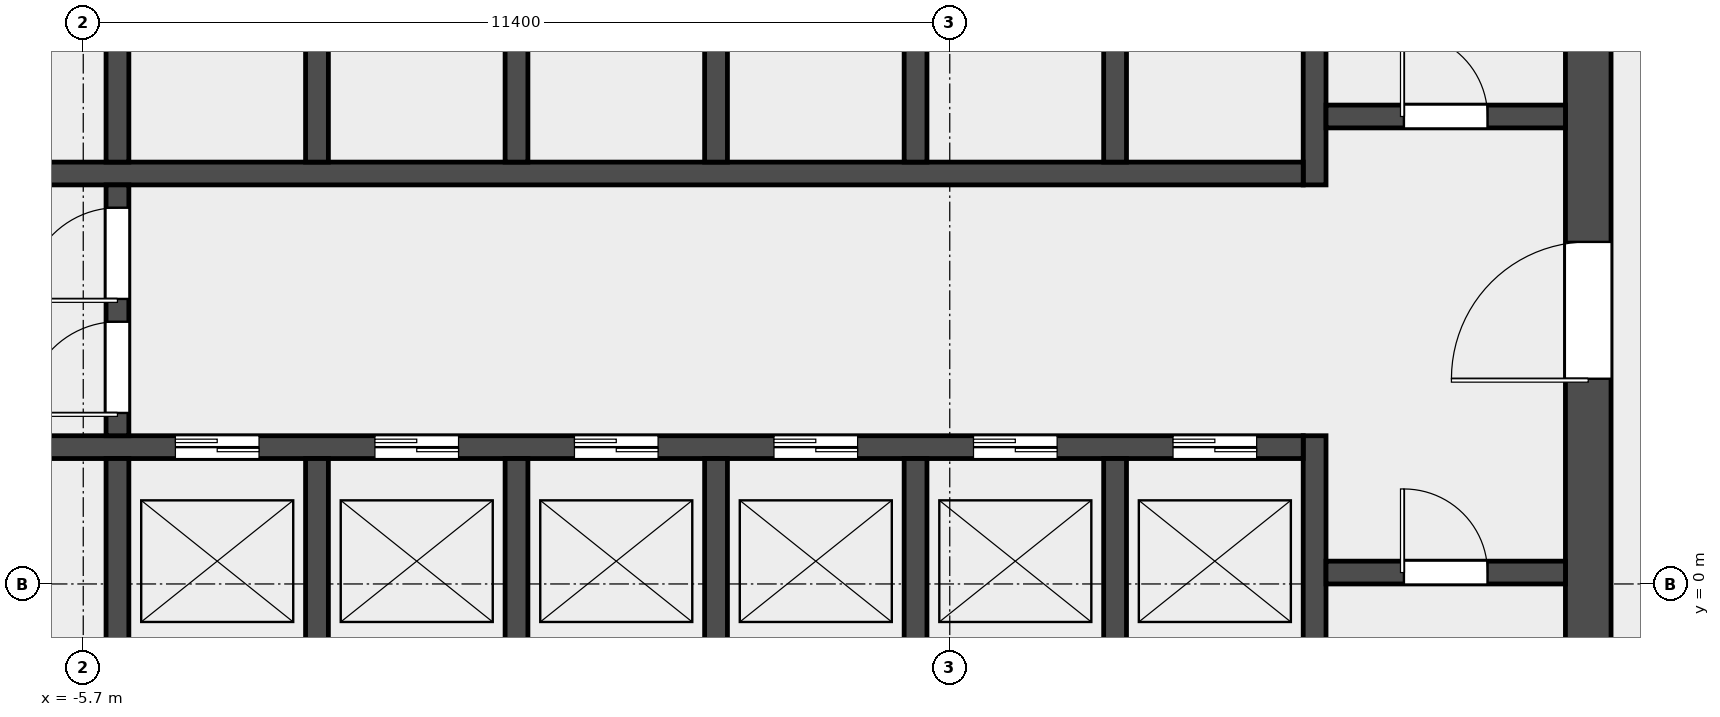
"""IFC4 building model, lengths in metres.
Left out: names, types, materials, properties, quantities, classifications, styles, units other than length and angle.
Written with IfcOpenShell. Run it as: python <this file> out.ifc"""

import sys

from ifc_helpers import new_model, si_unit, direction, frame, frame_2d, origin, place, context, subcontext, project, spatial, rectangle, extrude, element, fill, save


model = new_model("IFC4")
c1 = context("Model", 3, precision=1e-05, world=origin(), true_north=direction((0.0, 1.0)))
c2 = subcontext(c1, "Body", "Model", "MODEL_VIEW")
j1 = project(units=[si_unit("LENGTHUNIT", "METRE"), si_unit("PLANEANGLEUNIT", "RADIAN")], contexts=[c1])
p1 = place(None, origin())
s1 = spatial("IfcSite", under=j1, at=p1, CompositionType="ELEMENT")
p2 = place(p1, origin())
s2 = spatial("IfcBuilding", under=s1, at=p2, CompositionType="ELEMENT")
p3 = place(p2, frame((0.0, 0.0, 157.0)))
s3 = spatial("IfcBuildingStorey", under=s2, at=p3, CompositionType="ELEMENT", Elevation=157.0)
p4 = place(p3, frame((14.1, -6.6, 0.0), z_axis=(0.0, 0.0, 1.0), x_axis=(0.0, 1.0, 0.0)))
e1 = element("IfcWall", 1, at=p4, inside=s3, PredefinedType="SHEAR", context=c2, shape_type="SweptSolid", body=[
    extrude(rectangle(XDim=19.5, YDim=0.6, at=frame_2d((9.75, 0.0))), origin(), (0.0, 0.0, 1.0), 3.7),
])
p5 = place(p4, frame((9.3, 0.0, 0.0)))
e2 = element("IfcOpeningElement", 2, at=p5, cuts=e1, PredefinedType="OPENING", context=c2, shape_type="SweptSolid", body=[
    extrude(rectangle(XDim=1.8, YDim=2.1, at=frame_2d((0.9, 1.05))), frame((0.0, 0.312, 0.0), z_axis=(0.0, -1.0, 0.0), x_axis=(1.0, 0.0, 0.0)), (0.0, 0.0, 1.0), 0.624),
])
p6 = place(p3, frame((10.5, -6.6, 0.0), z_axis=(0.0, 0.0, 1.0), x_axis=(0.0, 1.0, 0.0)))
e3 = element("IfcWall", 3, at=p6, inside=s3, PredefinedType="SHEAR", context=c2, shape_type="SweptSolid", body=[
    extrude(rectangle(XDim=8.55, YDim=0.3, at=frame_2d((4.275, 0.0))), origin(), (0.0, 0.0, 1.0), 3.7),
])
p7 = place(p3, frame((10.5, 5.25, 0.0), z_axis=(0.0, 0.0, 1.0), x_axis=(0.0, 1.0, 0.0)))
e4 = element("IfcWall", 4, at=p7, inside=s3, PredefinedType="SHEAR", context=c2, shape_type="SweptSolid", body=[
    extrude(rectangle(XDim=7.65, YDim=0.3, at=frame_2d((3.825, 0.0))), origin(), (0.0, 0.0, 1.0), 3.7),
])
p8 = place(p3, frame((10.65, 0.15, 0.0), z_axis=(0.0, 0.0, 1.0), x_axis=(1.0, 0.0, 0.0)))
e5 = element("IfcWall", 5, at=p8, inside=s3, PredefinedType="SOLIDWALL", context=c2, shape_type="SweptSolid", body=[
    extrude(rectangle(XDim=3.15, YDim=0.3, at=frame_2d((1.575, 0.0))), origin(), (0.0, 0.0, 1.0), 3.7),
])
p9 = place(p8, frame((1.025, 0.0, 0.0)))
e6 = element("IfcOpeningElement", 6, at=p9, cuts=e5, PredefinedType="OPENING", context=c2, shape_type="SweptSolid", body=[
    extrude(rectangle(XDim=1.1, YDim=2.1, at=frame_2d((0.55, 1.05))), frame((0.0, 0.162, 0.0), z_axis=(0.0, -1.0, 0.0), x_axis=(1.0, 0.0, 0.0)), (0.0, 0.0, 1.0), 0.324),
])
p10 = place(p3, frame((10.65, 6.15, 0.0), z_axis=(0.0, 0.0, 1.0), x_axis=(1.0, 0.0, 0.0)))
e7 = element("IfcWall", 7, at=p10, inside=s3, PredefinedType="SOLIDWALL", context=c2, shape_type="SweptSolid", body=[
    extrude(rectangle(XDim=3.15, YDim=0.3, at=frame_2d((1.575, 0.0))), origin(), (0.0, 0.0, 1.0), 3.7),
])
p11 = place(p10, frame((1.025, 0.0, 0.0)))
e8 = element("IfcOpeningElement", 8, at=p11, cuts=e7, PredefinedType="OPENING", context=c2, shape_type="SweptSolid", body=[
    extrude(rectangle(XDim=1.1, YDim=2.1, at=frame_2d((0.55, 1.05))), frame((0.0, 0.162, 0.0), z_axis=(0.0, -1.0, 0.0), x_axis=(1.0, 0.0, 0.0)), (0.0, 0.0, 1.0), 0.324),
])
p12 = place(p3, frame((-10.35, 1.8, 0.0), z_axis=(0.0, 0.0, 1.0), x_axis=(1.0, 0.0, 0.0)))
e9 = element("IfcWall", 9, at=p12, inside=s3, PredefinedType="SOLIDWALL", context=c2, shape_type="SweptSolid", body=[
    extrude(rectangle(XDim=20.7, YDim=0.3, at=frame_2d((10.35, 0.0))), origin(), (0.0, 0.0, 1.0), 3.7),
])
p13 = place(p12, frame((0.512, 0.0, 0.0)))
e10 = element("IfcOpeningElement", 10, at=p13, cuts=e9, PredefinedType="OPENING", context=c2, shape_type="SweptSolid", body=[
    extrude(rectangle(XDim=1.3, YDim=2.1, at=frame_2d((0.65, 1.05))), frame((0.0, 0.162, 0.0), z_axis=(0.0, -1.0, 0.0), x_axis=(1.0, 0.0, 0.0)), (0.0, 0.0, 1.0), 0.324),
])
p14 = place(p12, frame((5.863, 0.0, 0.0)))
e11 = element("IfcOpeningElement", 11, at=p14, cuts=e9, PredefinedType="OPENING", context=c2, shape_type="SweptSolid", body=[
    extrude(rectangle(XDim=1.1, YDim=2.1, at=frame_2d((0.55, 1.05))), frame((0.0, 0.162, 0.0), z_axis=(0.0, -1.0, 0.0), x_axis=(1.0, 0.0, 0.0)), (0.0, 0.0, 1.0), 0.324),
])
p15 = place(p12, frame((8.488, 0.0, 0.0)))
e12 = element("IfcOpeningElement", 12, at=p15, cuts=e9, PredefinedType="OPENING", context=c2, shape_type="SweptSolid", body=[
    extrude(rectangle(XDim=1.1, YDim=2.1, at=frame_2d((0.55, 1.05))), frame((0.0, 0.162, 0.0), z_axis=(0.0, -1.0, 0.0), x_axis=(1.0, 0.0, 0.0)), (0.0, 0.0, 1.0), 0.324),
])
p16 = place(p12, frame((11.113, 0.0, 0.0)))
e13 = element("IfcOpeningElement", 13, at=p16, cuts=e9, PredefinedType="OPENING", context=c2, shape_type="SweptSolid", body=[
    extrude(rectangle(XDim=1.1, YDim=2.1, at=frame_2d((0.55, 1.05))), frame((0.0, 0.162, 0.0), z_axis=(0.0, -1.0, 0.0), x_axis=(1.0, 0.0, 0.0)), (0.0, 0.0, 1.0), 0.324),
])
p17 = place(p12, frame((13.738, 0.0, 0.0)))
e14 = element("IfcOpeningElement", 14, at=p17, cuts=e9, PredefinedType="OPENING", context=c2, shape_type="SweptSolid", body=[
    extrude(rectangle(XDim=1.1, YDim=2.1, at=frame_2d((0.55, 1.05))), frame((0.0, 0.162, 0.0), z_axis=(0.0, -1.0, 0.0), x_axis=(1.0, 0.0, 0.0)), (0.0, 0.0, 1.0), 0.324),
])
p18 = place(p12, frame((16.363, 0.0, 0.0)))
e15 = element("IfcOpeningElement", 15, at=p18, cuts=e9, PredefinedType="OPENING", context=c2, shape_type="SweptSolid", body=[
    extrude(rectangle(XDim=1.1, YDim=2.1, at=frame_2d((0.55, 1.05))), frame((0.0, 0.162, 0.0), z_axis=(0.0, -1.0, 0.0), x_axis=(1.0, 0.0, 0.0)), (0.0, 0.0, 1.0), 0.324),
])
p19 = place(p12, frame((18.988, 0.0, 0.0)))
e16 = element("IfcOpeningElement", 16, at=p19, cuts=e9, PredefinedType="OPENING", context=c2, shape_type="SweptSolid", body=[
    extrude(rectangle(XDim=1.1, YDim=2.1, at=frame_2d((0.55, 1.05))), frame((0.0, 0.162, 0.0), z_axis=(0.0, -1.0, 0.0), x_axis=(1.0, 0.0, 0.0)), (0.0, 0.0, 1.0), 0.324),
])
p20 = place(p3, frame((-10.35, 5.4, 0.0), z_axis=(0.0, 0.0, 1.0), x_axis=(1.0, 0.0, 0.0)))
e17 = element("IfcWall", 17, at=p20, inside=s3, PredefinedType="SOLIDWALL", context=c2, shape_type="SweptSolid", body=[
    extrude(rectangle(XDim=20.7, YDim=0.3, at=frame_2d((10.35, 0.0))), origin(), (0.0, 0.0, 1.0), 3.7),
])
p21 = place(p20, frame((0.512, 0.0, 0.0)))
e18 = element("IfcOpeningElement", 18, at=p21, cuts=e17, PredefinedType="OPENING", context=c2, shape_type="SweptSolid", body=[
    extrude(rectangle(XDim=1.3, YDim=2.1, at=frame_2d((0.65, 1.05))), frame((0.0, 0.162, 0.0), z_axis=(0.0, -1.0, 0.0), x_axis=(1.0, 0.0, 0.0)), (0.0, 0.0, 1.0), 0.324),
])
for number, where, z_axis, x_axis in (
    (19, (-5.25, -1.05, 0.0), (0.0, 0.0, 1.0), (0.0, 1.0, 0.0)),
    (20, (-2.625, -1.05, 0.0), (0.0, 0.0, 1.0), (0.0, 1.0, 0.0)),
    (21, (0.0, -1.05, 0.0), (0.0, 0.0, 1.0), (0.0, 1.0, 0.0)),
    (22, (2.625, -1.05, 0.0), (0.0, 0.0, 1.0), (0.0, 1.0, 0.0)),
    (23, (5.25, -1.05, 0.0), (0.0, 0.0, 1.0), (0.0, 1.0, 0.0)),
    (24, (7.875, -1.05, 0.0), (0.0, 0.0, 1.0), (0.0, 1.0, 0.0)),
    (25, (-5.25, 5.55, 0.0), (0.0, 0.0, 1.0), (0.0, 1.0, 0.0)),
    (26, (-2.625, 5.55, 0.0), (0.0, 0.0, 1.0), (0.0, 1.0, 0.0)),
    (27, (0.0, 5.55, 0.0), (0.0, 0.0, 1.0), (0.0, 1.0, 0.0)),
    (28, (2.625, 5.55, 0.0), (0.0, 0.0, 1.0), (0.0, 1.0, 0.0)),
    (29, (5.25, 5.55, 0.0), (0.0, 0.0, 1.0), (0.0, 1.0, 0.0)),
    (30, (7.875, 5.55, 0.0), (0.0, 0.0, 1.0), (0.0, 1.0, 0.0)),
):
    element("IfcWall", number, at=place(p3, frame(where, z_axis=z_axis, x_axis=x_axis)), inside=s3, PredefinedType="SOLIDWALL", context=c2, shape_type="SweptSolid", body=[
        extrude(rectangle(XDim=2.7, YDim=0.3, at=frame_2d((1.35, 0.0))), origin(), (0.0, 0.0, 1.0), 3.7),
    ])
p22 = place(p3, frame((-5.25, 1.95, 0.0), z_axis=(0.0, 0.0, 1.0), x_axis=(0.0, 1.0, 0.0)))
e31 = element("IfcWall", 31, at=p22, inside=s3, PredefinedType="SOLIDWALL", context=c2, shape_type="SweptSolid", body=[
    extrude(rectangle(XDim=3.3, YDim=0.3, at=frame_2d((1.65, 0.0))), origin(), (0.0, 0.0, 1.0), 3.7),
])
p23 = place(p22, frame((0.3, 0.0, 0.0)))
e32 = element("IfcOpeningElement", 32, at=p23, cuts=e31, PredefinedType="OPENING", context=c2, shape_type="SweptSolid", body=[
    extrude(rectangle(XDim=1.2, YDim=2.1, at=frame_2d((0.6, 1.05))), frame((0.0, 0.162, 0.0), z_axis=(0.0, -1.0, 0.0), x_axis=(1.0, 0.0, 0.0)), (0.0, 0.0, 1.0), 0.324),
])
p24 = place(p22, frame((1.8, 0.0, 0.0)))
e33 = element("IfcOpeningElement", 33, at=p24, cuts=e31, PredefinedType="OPENING", context=c2, shape_type="SweptSolid", body=[
    extrude(rectangle(XDim=1.2, YDim=2.1, at=frame_2d((0.6, 1.05))), frame((0.0, 0.162, 0.0), z_axis=(0.0, -1.0, 0.0), x_axis=(1.0, 0.0, 0.0)), (0.0, 0.0, 1.0), 0.324),
])
p25 = place(p9, origin())
e34 = element("IfcDoor", 34, at=p25, inside=s3, OperationType="SINGLE_SWING_RIGHT", PredefinedType="DOOR", context=c2, shape_type="SweptSolid", body=[
    extrude(rectangle(XDim=1.1, YDim=2.1, at=frame_2d((0.55, 1.05))), frame((0.0, 0.025, 0.0), z_axis=(0.0, -1.0, 0.0), x_axis=(1.0, 0.0, 0.0)), (0.0, 0.0, 1.0), 0.05),
])
fill(e6, e34)
p26 = place(p11, origin())
e35 = element("IfcDoor", 35, at=p26, inside=s3, OperationType="SINGLE_SWING_RIGHT", PredefinedType="DOOR", context=c2, shape_type="SweptSolid", body=[
    extrude(rectangle(XDim=1.1, YDim=2.1, at=frame_2d((0.55, 1.05))), frame((0.0, 0.025, 0.0), z_axis=(0.0, -1.0, 0.0), x_axis=(1.0, 0.0, 0.0)), (0.0, 0.0, 1.0), 0.05),
])
fill(e8, e35)
p27 = place(p5, origin())
e36 = element("IfcDoor", 36, at=p27, inside=s3, OperationType="DOUBLE_DOOR_SINGLE_SWING", PredefinedType="DOOR", context=c2, shape_type="SweptSolid", body=[
    extrude(rectangle(XDim=1.8, YDim=2.1, at=frame_2d((0.9, 1.05))), frame((0.0, 0.025, 0.0), z_axis=(0.0, -1.0, 0.0), x_axis=(1.0, 0.0, 0.0)), (0.0, 0.0, 1.0), 0.05),
])
fill(e2, e36)
p28 = place(p23, origin())
e37 = element("IfcDoor", 37, at=p28, inside=s3, OperationType="SINGLE_SWING_LEFT", PredefinedType="DOOR", context=c2, shape_type="SweptSolid", body=[
    extrude(rectangle(XDim=1.2, YDim=2.1, at=frame_2d((0.6, 1.05))), frame((0.0, 0.025, 0.0), z_axis=(0.0, -1.0, 0.0), x_axis=(1.0, 0.0, 0.0)), (0.0, 0.0, 1.0), 0.05),
])
fill(e32, e37)
p29 = place(p24, origin())
e38 = element("IfcDoor", 38, at=p29, inside=s3, OperationType="SINGLE_SWING_RIGHT", PredefinedType="DOOR", context=c2, shape_type="SweptSolid", body=[
    extrude(rectangle(XDim=1.2, YDim=2.1, at=frame_2d((0.6, 1.05))), frame((0.0, 0.025, 0.0), z_axis=(0.0, -1.0, 0.0), x_axis=(1.0, 0.0, 0.0)), (0.0, 0.0, 1.0), 0.05),
])
fill(e33, e38)
p30 = place(p14, origin())
e39 = element("IfcDoor", 39, at=p30, inside=s3, OperationType="DOUBLE_DOOR_SLIDING", PredefinedType="DOOR", context=c2, shape_type="SweptSolid", body=[
    extrude(rectangle(XDim=1.1, YDim=2.1, at=frame_2d((0.55, 1.05))), frame((0.0, 0.025, 0.0), z_axis=(0.0, -1.0, 0.0), x_axis=(1.0, 0.0, 0.0)), (0.0, 0.0, 1.0), 0.05),
])
fill(e11, e39)
p31 = place(p15, origin())
e40 = element("IfcDoor", 40, at=p31, inside=s3, OperationType="DOUBLE_DOOR_SLIDING", PredefinedType="DOOR", context=c2, shape_type="SweptSolid", body=[
    extrude(rectangle(XDim=1.1, YDim=2.1, at=frame_2d((0.55, 1.05))), frame((0.0, 0.025, 0.0), z_axis=(0.0, -1.0, 0.0), x_axis=(1.0, 0.0, 0.0)), (0.0, 0.0, 1.0), 0.05),
])
fill(e12, e40)
p32 = place(p16, origin())
e41 = element("IfcDoor", 41, at=p32, inside=s3, OperationType="DOUBLE_DOOR_SLIDING", PredefinedType="DOOR", context=c2, shape_type="SweptSolid", body=[
    extrude(rectangle(XDim=1.1, YDim=2.1, at=frame_2d((0.55, 1.05))), frame((0.0, 0.025, 0.0), z_axis=(0.0, -1.0, 0.0), x_axis=(1.0, 0.0, 0.0)), (0.0, 0.0, 1.0), 0.05),
])
fill(e13, e41)
p33 = place(p17, origin())
e42 = element("IfcDoor", 42, at=p33, inside=s3, OperationType="DOUBLE_DOOR_SLIDING", PredefinedType="DOOR", context=c2, shape_type="SweptSolid", body=[
    extrude(rectangle(XDim=1.1, YDim=2.1, at=frame_2d((0.55, 1.05))), frame((0.0, 0.025, 0.0), z_axis=(0.0, -1.0, 0.0), x_axis=(1.0, 0.0, 0.0)), (0.0, 0.0, 1.0), 0.05),
])
fill(e14, e42)
p34 = place(p18, origin())
e43 = element("IfcDoor", 43, at=p34, inside=s3, OperationType="DOUBLE_DOOR_SLIDING", PredefinedType="DOOR", context=c2, shape_type="SweptSolid", body=[
    extrude(rectangle(XDim=1.1, YDim=2.1, at=frame_2d((0.55, 1.05))), frame((0.0, 0.025, 0.0), z_axis=(0.0, -1.0, 0.0), x_axis=(1.0, 0.0, 0.0)), (0.0, 0.0, 1.0), 0.05),
])
fill(e15, e43)
p35 = place(p19, origin())
e44 = element("IfcDoor", 44, at=p35, inside=s3, OperationType="DOUBLE_DOOR_SLIDING", PredefinedType="DOOR", context=c2, shape_type="SweptSolid", body=[
    extrude(rectangle(XDim=1.1, YDim=2.1, at=frame_2d((0.55, 1.05))), frame((0.0, 0.025, 0.0), z_axis=(0.0, -1.0, 0.0), x_axis=(1.0, 0.0, 0.0)), (0.0, 0.0, 1.0), 0.05),
])
fill(e16, e44)
save(model, sys.argv[1])
